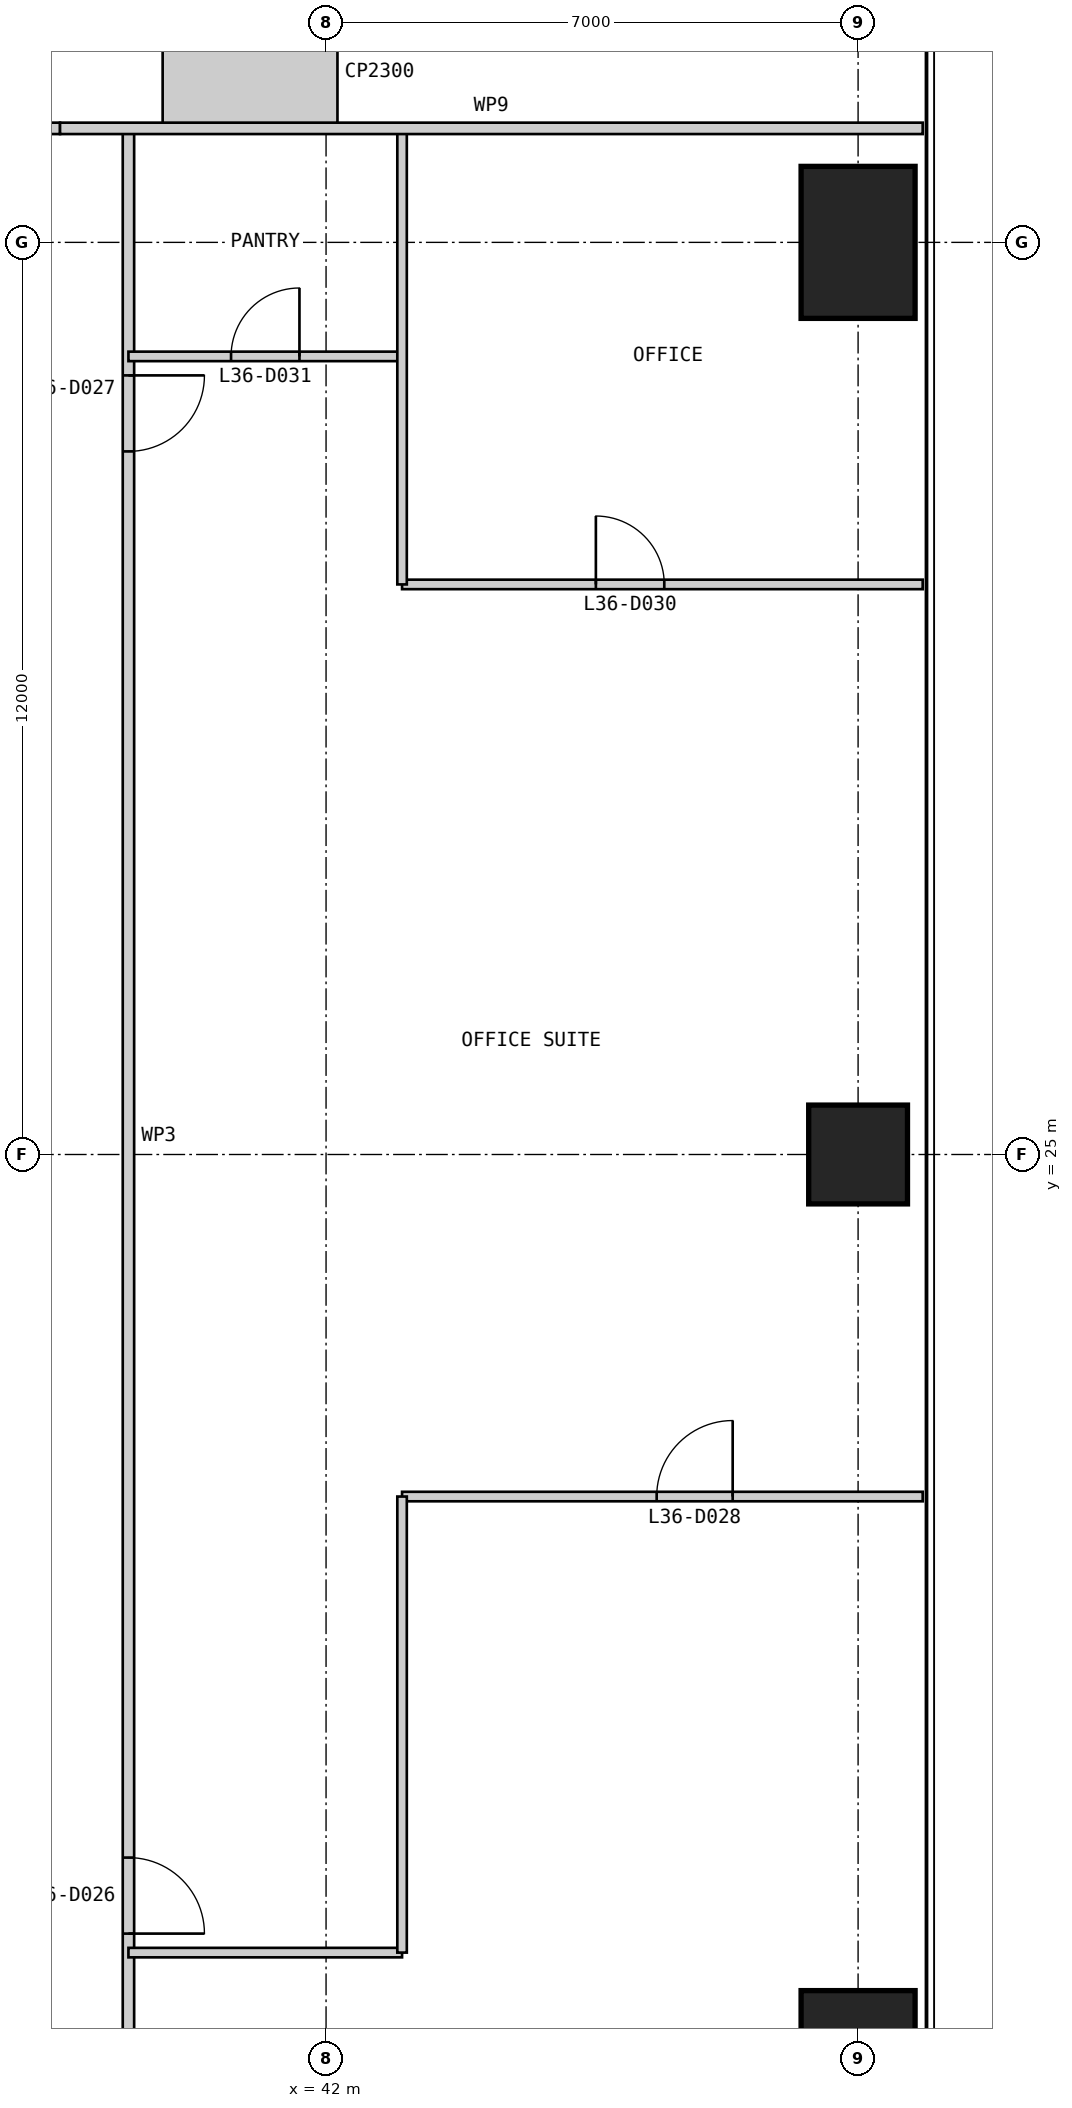
"""IFC4 building model, lengths in metres.
Left out: names, types, materials, properties, quantities, classifications, styles, units other than length and angle.
Written with IfcOpenShell. Run it as: python <this file> out.ifc"""

import sys

from ifc_helpers import new_model, si_unit, direction, frame, frame_2d, origin, origin_2d, place, context, subcontext, project, spatial, rectangle, extrude, element, fill, save


model = new_model("IFC4")
c1 = context("Model", 3, precision=1e-05, world=origin(), true_north=direction((0.0, 1.0)))
c2 = subcontext(c1, "Body", "Model", "MODEL_VIEW")
j1 = project(units=[si_unit("LENGTHUNIT", "METRE"), si_unit("PLANEANGLEUNIT", "RADIAN")], contexts=[c1])
p1 = place(None, origin())
s1 = spatial("IfcSite", under=j1, at=p1, CompositionType="ELEMENT")
p2 = place(p1, origin())
s2 = spatial("IfcBuilding", under=s1, at=p2, CompositionType="ELEMENT")
p3 = place(p2, frame((0.0, 0.0, 154.4)))
s3 = spatial("IfcBuildingStorey", under=s2, at=p3, CompositionType="ELEMENT", Elevation=154.4)
p4 = place(p3, frame((49.0, 13.0, 0.0), z_axis=(0.0, 0.0, 1.0), x_axis=(1.0, 0.0, 0.0)))
e1 = element("IfcColumn", 1, at=p4, inside=s3, PredefinedType="COLUMN", context=c2, shape_type="SweptSolid", body=[
    extrude(rectangle(XDim=1.5, YDim=2.0, at=origin_2d()), origin(), (0.0, 0.0, 1.0), 4.0),
])
p5 = place(p3, frame((49.0, 25.0, 0.0), z_axis=(0.0, 0.0, 1.0), x_axis=(1.0, 0.0, 0.0)))
e2 = element("IfcColumn", 2, at=p5, inside=s3, PredefinedType="COLUMN", context=c2, shape_type="SweptSolid", body=[
    extrude(rectangle(XDim=1.3, YDim=1.3, at=origin_2d()), origin(), (0.0, 0.0, 1.0), 4.0),
])
p6 = place(p3, frame((49.0, 37.0, 0.0), z_axis=(0.0, 0.0, 1.0), x_axis=(1.0, 0.0, 0.0)))
e3 = element("IfcColumn", 3, at=p6, inside=s3, PredefinedType="COLUMN", context=c2, shape_type="SweptSolid", body=[
    extrude(rectangle(XDim=1.5, YDim=2.0, at=origin_2d()), origin(), (0.0, 0.0, 1.0), 4.0),
])
p7 = place(p3, frame((39.4, 11.5, 0.0), z_axis=(0.0, 0.0, 1.0), x_axis=(0.0, 1.0, 0.0)))
e4 = element("IfcWall", 4, at=p7, inside=s3, PredefinedType="PARTITIONING", context=c2, shape_type="SweptSolid", body=[
    extrude(rectangle(XDim=27.0, YDim=0.15, at=frame_2d((13.5, 0.0))), origin(), (0.0, 0.0, 1.0), 3.85),
])
p8 = place(p7, frame((3.25, 0.0, 0.0)))
e5 = element("IfcOpeningElement", 5, at=p8, cuts=e4, PredefinedType="OPENING", context=c2, shape_type="SweptSolid", body=[
    extrude(rectangle(XDim=1.0, YDim=2.2, at=frame_2d((0.5, 1.1))), frame((0.0, 0.085, 0.0), z_axis=(0.0, -1.0, 0.0), x_axis=(1.0, 0.0, 0.0)), (0.0, 0.0, 1.0), 0.17),
])
p9 = place(p7, frame((22.75, 0.0, 0.0)))
e6 = element("IfcOpeningElement", 6, at=p9, cuts=e4, PredefinedType="OPENING", context=c2, shape_type="SweptSolid", body=[
    extrude(rectangle(XDim=1.0, YDim=2.2, at=frame_2d((0.5, 1.1))), frame((0.0, 0.085, 0.0), z_axis=(0.0, -1.0, 0.0), x_axis=(1.0, 0.0, 0.0)), (0.0, 0.0, 1.0), 0.17),
])
p10 = place(p7, frame((0.25, 0.0, 0.0)))
e7 = element("IfcOpeningElement", 7, at=p10, cuts=e4, PredefinedType="OPENING", context=c2, shape_type="SweptSolid", body=[
    extrude(rectangle(XDim=1.0, YDim=2.2, at=frame_2d((0.5, 1.1))), frame((0.0, 0.085, 0.0), z_axis=(0.0, -1.0, 0.0), x_axis=(1.0, 0.0, 0.0)), (0.0, 0.0, 1.0), 0.17),
])
p11 = place(p3, frame((43.0, 14.5, 0.0), z_axis=(0.0, 0.0, 1.0), x_axis=(-1.0, 0.0, 0.0)))
e8 = element("IfcWall", 8, at=p11, inside=s3, PredefinedType="PARTITIONING", context=c2, shape_type="SweptSolid", body=[
    extrude(rectangle(XDim=3.6, YDim=0.125, at=frame_2d((1.8, 0.0))), origin(), (0.0, 0.0, 1.0), 3.85),
])
p12 = place(p3, frame((49.85, 20.5, 0.0), z_axis=(0.0, 0.0, 1.0), x_axis=(-1.0, 0.0, 0.0)))
e9 = element("IfcWall", 9, at=p12, inside=s3, PredefinedType="PARTITIONING", context=c2, shape_type="SweptSolid", body=[
    extrude(rectangle(XDim=6.85, YDim=0.125, at=frame_2d((3.425, 0.0))), origin(), (0.0, 0.0, 1.0), 3.85),
])
p13 = place(p12, frame((2.5, 0.0, 0.0)))
e10 = element("IfcOpeningElement", 10, at=p13, cuts=e9, PredefinedType="OPENING", context=c2, shape_type="SweptSolid", body=[
    extrude(rectangle(XDim=1.0, YDim=2.2, at=frame_2d((0.5, 1.1))), frame((0.0, 0.073, 0.0), z_axis=(0.0, -1.0, 0.0), x_axis=(1.0, 0.0, 0.0)), (0.0, 0.0, 1.0), 0.145),
])
p14 = place(p3, frame((49.85, 32.5, 0.0), z_axis=(0.0, 0.0, 1.0), x_axis=(-1.0, 0.0, 0.0)))
e11 = element("IfcWall", 11, at=p14, inside=s3, PredefinedType="PARTITIONING", context=c2, shape_type="SweptSolid", body=[
    extrude(rectangle(XDim=6.85, YDim=0.125, at=frame_2d((3.425, 0.0))), origin(), (0.0, 0.0, 1.0), 3.85),
])
p15 = place(p14, frame((3.4, 0.0, 0.0)))
e12 = element("IfcOpeningElement", 12, at=p15, cuts=e11, PredefinedType="OPENING", context=c2, shape_type="SweptSolid", body=[
    extrude(rectangle(XDim=0.9, YDim=2.2, at=frame_2d((0.45, 1.1))), frame((0.0, 0.073, 0.0), z_axis=(0.0, -1.0, 0.0), x_axis=(1.0, 0.0, 0.0)), (0.0, 0.0, 1.0), 0.145),
])
p16 = place(p3, frame((43.0, 35.5, 0.0), z_axis=(0.0, 0.0, 1.0), x_axis=(-1.0, 0.0, 0.0)))
e13 = element("IfcWall", 13, at=p16, inside=s3, PredefinedType="PARTITIONING", context=c2, shape_type="SweptSolid", body=[
    extrude(rectangle(XDim=3.6, YDim=0.125, at=frame_2d((1.8, 0.0))), origin(), (0.0, 0.0, 1.0), 3.85),
])
p17 = place(p16, frame((1.35, 0.0, 0.0)))
e14 = element("IfcOpeningElement", 14, at=p17, cuts=e13, PredefinedType="OPENING", context=c2, shape_type="SweptSolid", body=[
    extrude(rectangle(XDim=0.9, YDim=2.2, at=frame_2d((0.45, 1.1))), frame((0.0, 0.073, 0.0), z_axis=(0.0, -1.0, 0.0), x_axis=(1.0, 0.0, 0.0)), (0.0, 0.0, 1.0), 0.145),
])
for number, where, z_axis, x_axis in (
    (15, (43.0, 14.5, 0.0), (0.0, 0.0, 1.0), (0.0, 1.0, 0.0)),
    (16, (43.0, 32.5, 0.0), (0.0, 0.0, 1.0), (0.0, 1.0, 0.0)),
):
    element("IfcWall", number, at=place(p3, frame(where, z_axis=z_axis, x_axis=x_axis)), inside=s3, PredefinedType="PARTITIONING", context=c2, shape_type="SweptSolid", body=[
        extrude(rectangle(XDim=6.0, YDim=0.125, at=frame_2d((3.0, 0.0))), origin(), (0.0, 0.0, 1.0), 3.238),
    ])
p18 = place(p3, frame((38.5, 38.5, 0.0), z_axis=(0.0, 0.0, 1.0), x_axis=(-1.0, 0.0, 0.0)))
e17 = element("IfcWall", 17, at=p18, inside=s3, PredefinedType="PARTITIONING", context=c2, shape_type="SweptSolid", body=[
    extrude(rectangle(XDim=27.0, YDim=0.15, at=frame_2d((13.5, 0.0))), origin(), (0.0, 0.0, 1.0), 3.85),
])
p19 = place(p18, frame((13.0, 0.0, 0.0)))
e18 = element("IfcOpeningElement", 18, at=p19, cuts=e17, PredefinedType="OPENING", context=c2, shape_type="SweptSolid", body=[
    extrude(rectangle(XDim=1.0, YDim=2.2, at=frame_2d((0.5, 1.1))), frame((0.0, 0.085, 0.0), z_axis=(0.0, -1.0, 0.0), x_axis=(1.0, 0.0, 0.0)), (0.0, 0.0, 1.0), 0.17),
])
p20 = place(p3, frame((49.85, 38.5, 0.0), z_axis=(0.0, 0.0, 1.0), x_axis=(-1.0, 0.0, 0.0)))
e19 = element("IfcWall", 19, at=p20, inside=s3, PredefinedType="PARTITIONING", context=c2, shape_type="SweptSolid", body=[
    extrude(rectangle(XDim=11.35, YDim=0.15, at=frame_2d((5.675, 0.0))), origin(), (0.0, 0.0, 1.0), 3.85),
])
p21 = place(p3, frame((41.0, 38.575, 0.0), z_axis=(0.0, 0.0, 1.0), x_axis=(0.0, 1.0, 0.0)))
e20 = element("IfcWall", 20, at=p21, inside=s3, PredefinedType="PARTITIONING", context=c2, shape_type="SweptSolid", body=[
    extrude(rectangle(XDim=1.325, YDim=2.3, at=frame_2d((0.663, 0.0))), origin(), (0.0, 0.0, 1.0), 3.85),
])
p22 = place(p8, frame((1.0, 0.0, 0.0), z_axis=(0.0, 0.0, 1.0), x_axis=(-1.0, 0.0, 0.0)))
e21 = element("IfcDoor", 21, at=p22, inside=s3, OperationType="SINGLE_SWING_RIGHT", PredefinedType="DOOR", context=c2, shape_type="SweptSolid", body=[
    extrude(rectangle(XDim=1.0, YDim=2.2, at=frame_2d((0.5, 1.1))), frame((0.0, 0.025, 0.0), z_axis=(0.0, -1.0, 0.0), x_axis=(1.0, 0.0, 0.0)), (0.0, 0.0, 1.0), 0.05),
])
fill(e5, e21)
p23 = place(p9, frame((1.0, 0.0, 0.0), z_axis=(0.0, 0.0, 1.0), x_axis=(-1.0, 0.0, 0.0)))
e22 = element("IfcDoor", 22, at=p23, inside=s3, OperationType="SINGLE_SWING_LEFT", PredefinedType="DOOR", context=c2, shape_type="SweptSolid", body=[
    extrude(rectangle(XDim=1.0, YDim=2.2, at=frame_2d((0.5, 1.1))), frame((0.0, 0.025, 0.0), z_axis=(0.0, -1.0, 0.0), x_axis=(1.0, 0.0, 0.0)), (0.0, 0.0, 1.0), 0.05),
])
fill(e6, e22)
p24 = place(p13, frame((1.0, 0.0, 0.0), z_axis=(0.0, 0.0, 1.0), x_axis=(-1.0, 0.0, 0.0)))
e23 = element("IfcDoor", 23, at=p24, inside=s3, OperationType="SINGLE_SWING_RIGHT", PredefinedType="DOOR", context=c2, shape_type="SweptSolid", body=[
    extrude(rectangle(XDim=1.0, YDim=2.2, at=frame_2d((0.5, 1.1))), frame((0.0, 0.025, 0.0), z_axis=(0.0, -1.0, 0.0), x_axis=(1.0, 0.0, 0.0)), (0.0, 0.0, 1.0), 0.05),
])
fill(e10, e23)
p25 = place(p15, frame((0.9, 0.0, 0.0), z_axis=(0.0, 0.0, 1.0), x_axis=(-1.0, 0.0, 0.0)))
e24 = element("IfcDoor", 24, at=p25, inside=s3, OperationType="SINGLE_SWING_LEFT", PredefinedType="DOOR", context=c2, shape_type="SweptSolid", body=[
    extrude(rectangle(XDim=0.9, YDim=2.2, at=frame_2d((0.45, 1.1))), frame((0.0, 0.025, 0.0), z_axis=(0.0, -1.0, 0.0), x_axis=(1.0, 0.0, 0.0)), (0.0, 0.0, 1.0), 0.05),
])
fill(e12, e24)
p26 = place(p17, frame((0.9, 0.0, 0.0), z_axis=(0.0, 0.0, 1.0), x_axis=(-1.0, 0.0, 0.0)))
e25 = element("IfcDoor", 25, at=p26, inside=s3, OperationType="SINGLE_SWING_RIGHT", PredefinedType="DOOR", context=c2, shape_type="SweptSolid", body=[
    extrude(rectangle(XDim=0.9, YDim=2.2, at=frame_2d((0.45, 1.1))), frame((0.0, 0.025, 0.0), z_axis=(0.0, -1.0, 0.0), x_axis=(1.0, 0.0, 0.0)), (0.0, 0.0, 1.0), 0.05),
])
fill(e14, e25)
save(model, sys.argv[1])
